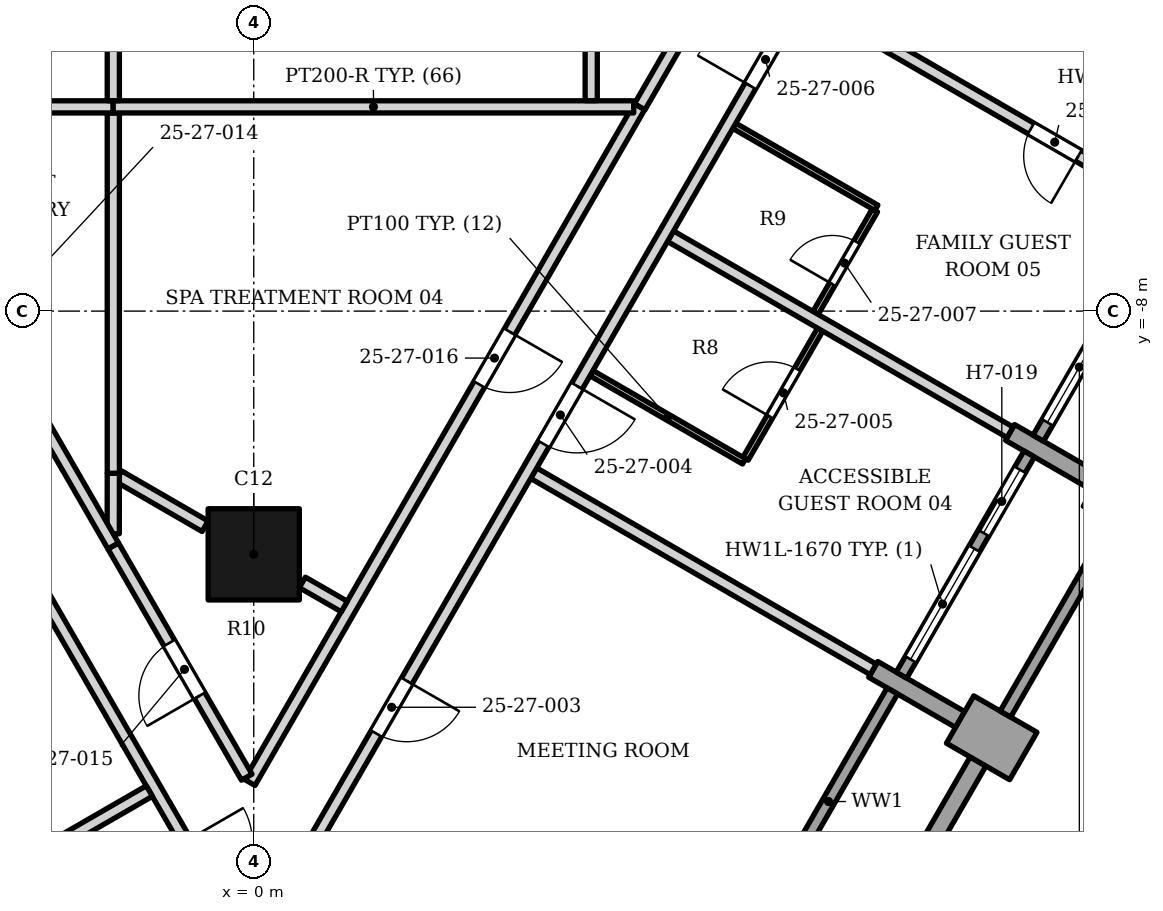
"""IFC4 building model, lengths in metres.
Left out: names, types, materials, properties, quantities, classifications, styles, units other than length and angle.
Written with IfcOpenShell. Run it as: python <this file> out.ifc"""

import sys

from ifc_helpers import new_model, si_unit, direction, frame, frame_2d, origin, origin_2d, place, context, subcontext, project, spatial, rectangle, extrude, element, fill, save


model = new_model("IFC4")
c1 = context("Model", 3, precision=1e-05, world=origin(), true_north=direction((0.0, 1.0)))
c2 = subcontext(c1, "Body", "Model", "MODEL_VIEW")
j1 = project(units=[si_unit("LENGTHUNIT", "METRE"), si_unit("PLANEANGLEUNIT", "RADIAN")], contexts=[c1])
p1 = place(None, origin())
s1 = spatial("IfcSite", under=j1, at=p1, CompositionType="ELEMENT")
p2 = place(p1, origin())
s2 = spatial("IfcBuilding", under=s1, at=p2, CompositionType="ELEMENT")
p3 = place(p2, frame((0.0, 0.0, 112.2)))
s3 = spatial("IfcBuildingStorey", under=s2, at=p3, CompositionType="ELEMENT", Elevation=112.2)
p4 = place(p3, frame((0.0, -12.0, 0.0), z_axis=(0.0, 0.0, 1.0), x_axis=(1.0, 0.0, 0.0)))
e1 = element("IfcColumn", 1, at=p4, inside=s3, PredefinedType="COLUMN", context=c2, shape_type="SweptSolid", body=[
    extrude(rectangle(XDim=1.5, YDim=1.5, at=origin_2d()), origin(), (0.0, 0.0, 1.0), 3.4),
])
p5 = place(p3, frame((14.387, -11.119, 0.0), z_axis=(0.0, 0.0, 1.0), x_axis=(0.5, 0.866025403784, 0.0)))
e2 = element("IfcColumn", 2, at=p5, inside=s3, PredefinedType="COLUMN", context=c2, shape_type="SweptSolid", body=[
    extrude(rectangle(XDim=0.9, YDim=1.2, at=origin_2d()), origin(), (0.0, 0.0, 1.0), 3.4),
])
p6 = place(p3, frame((12.656, -15.317, 0.0), z_axis=(0.0, 0.0, 1.0), x_axis=(-0.866006032174, 0.500033551112, 0.0)))
e3 = element("IfcWall", 3, at=p6, inside=s3, PredefinedType="SOLIDWALL", context=c2, shape_type="SweptSolid", body=[
    extrude(rectangle(XDim=1.2, YDim=0.9, at=frame_2d((0.6, 0.0))), origin(), (0.0, 0.0, 1.0), 2.63),
])
p7 = place(p3, frame((11.617, -14.717, 0.0), z_axis=(0.0, 0.0, 1.0), x_axis=(-0.866040211805, 0.499974350878, 0.0)))
e4 = element("IfcWall", 4, at=p7, inside=s3, PredefinedType="SOLIDWALL", context=c2, shape_type="SweptSolid", body=[
    extrude(rectangle(XDim=1.65, YDim=0.3, at=frame_2d((0.825, 0.0))), origin(), (0.0, 0.0, 1.0), 2.65),
])
p8 = place(p3, frame((12.438, -9.994, 0.0), z_axis=(0.0, 0.0, 1.0), x_axis=(0.866040211805, -0.499974350878, 0.0)))
e5 = element("IfcWall", 5, at=p8, inside=s3, PredefinedType="SOLIDWALL", context=c2, shape_type="SweptSolid", body=[
    extrude(rectangle(XDim=1.65, YDim=0.3, at=frame_2d((0.825, 0.0))), origin(), (0.0, 0.0, 1.0), 2.384),
])
p9 = place(p3, frame((10.112, -18.524, 0.0), z_axis=(0.0, 0.0, 1.0), x_axis=(0.500012057535, 0.866018442252, 0.0)))
e6 = element("IfcWall", 6, at=p9, inside=s3, PredefinedType="SOLIDWALL", context=c2, shape_type="SweptSolid", body=[
    extrude(rectangle(XDim=3.6, YDim=0.3, at=frame_2d((1.8, 0.0))), origin(), (0.0, 0.0, 1.0), 2.63),
])
p10 = place(p3, frame((8.403, -17.884, 0.0), z_axis=(0.0, 0.0, 1.0), x_axis=(0.49998411664, 0.866034573852, 0.0)))
e7 = element("IfcWall", 7, at=p10, inside=s3, PredefinedType="ELEMENTEDWALL", context=c2, shape_type="SweptSolid", body=[
    extrude(rectangle(XDim=4.2, YDim=0.2, at=frame_2d((2.1, 0.0))), origin(), (0.0, 0.0, 1.0), 2.65),
])
p11 = place(p3, frame((12.362, -14.627, 0.0), z_axis=(0.0, 0.0, 1.0), x_axis=(0.500012057535, 0.866018442252, 0.0)))
e8 = element("IfcWall", 8, at=p11, inside=s3, PredefinedType="SOLIDWALL", context=c2, shape_type="SweptSolid", body=[
    extrude(rectangle(XDim=3.6, YDim=0.2, at=frame_2d((1.8, 0.0))), origin(), (0.0, 0.0, 1.0), 2.374),
])
p12 = place(p3, frame((10.653, -13.987, 0.0), z_axis=(0.0, 0.0, 1.0), x_axis=(0.499958946799, 0.866049104564, 0.0)))
e9 = element("IfcWall", 9, at=p12, inside=s3, PredefinedType="ELEMENTEDWALL", context=c2, shape_type="SweptSolid", body=[
    extrude(rectangle(XDim=4.2, YDim=0.2, at=frame_2d((2.1, 0.0))), origin(), (0.0, 0.0, 1.0), 2.374),
])
p13 = place(p12, frame((0.3, 0.0, 0.6)))
e10 = element("IfcOpeningElement", 10, at=p13, cuts=e9, PredefinedType="OPENING", context=c2, shape_type="SweptSolid", body=[
    extrude(rectangle(XDim=2.1, YDim=1.67, at=frame_2d((1.05, 0.835))), frame((0.0, 0.11, 0.0), z_axis=(0.0, -1.0, 0.0), x_axis=(1.0, 0.0, 0.0)), (0.0, 0.0, 1.0), 0.22),
])
p14 = place(p12, frame((2.7, 0.0, 0.0)))
e11 = element("IfcOpeningElement", 11, at=p14, cuts=e9, PredefinedType="OPENING", context=c2, shape_type="SweptSolid", body=[
    extrude(rectangle(XDim=1.2, YDim=2.27, at=frame_2d((0.6, 1.135))), frame((0.0, 0.11, 0.0), z_axis=(0.0, -1.0, 0.0), x_axis=(1.0, 0.0, 0.0)), (0.0, 0.0, 1.0), 0.22),
])
p15 = place(p3, frame((12.903, -10.09, 0.0), z_axis=(0.0, 0.0, 1.0), x_axis=(0.49998411664, 0.866034573852, 0.0)))
e12 = element("IfcWall", 12, at=p15, inside=s3, PredefinedType="ELEMENTEDWALL", context=c2, shape_type="SweptSolid", body=[
    extrude(rectangle(XDim=4.2, YDim=0.2, at=frame_2d((2.1, 0.0))), origin(), (0.0, 0.0, 1.0), 2.384),
])
p16 = place(p15, frame((0.3, 0.0, 0.6)))
e13 = element("IfcOpeningElement", 13, at=p16, cuts=e12, PredefinedType="OPENING", context=c2, shape_type="SweptSolid", body=[
    extrude(rectangle(XDim=2.1, YDim=1.68, at=frame_2d((1.05, 0.84))), frame((0.0, 0.11, 0.0), z_axis=(0.0, -1.0, 0.0), x_axis=(1.0, 0.0, 0.0)), (0.0, 0.0, 1.0), 0.22),
])
p17 = place(p15, frame((2.7, 0.0, 0.0)))
e14 = element("IfcOpeningElement", 14, at=p17, cuts=e12, PredefinedType="OPENING", context=c2, shape_type="SweptSolid", body=[
    extrude(rectangle(XDim=1.2, YDim=2.28, at=frame_2d((0.6, 1.14))), frame((0.0, 0.11, 0.0), z_axis=(0.0, -1.0, 0.0), x_axis=(1.0, 0.0, 0.0)), (0.0, 0.0, 1.0), 0.22),
])
p18 = place(p3, frame((-12.882, 3.644, 0.0), z_axis=(0.0, 0.0, 1.0), x_axis=(0.500000325599, -0.866025215799, 0.0)))
e15 = element("IfcWall", 15, at=p18, inside=s3, PredefinedType="PARTITIONING", context=c2, shape_type="SweptSolid", body=[
    extrude(rectangle(XDim=25.63, YDim=0.2, at=frame_2d((12.815, 0.0))), origin(), (0.0, 0.0, 1.0), 2.384),
])
p19 = place(p18, frame((4.0, 0.0, 0.0)))
e16 = element("IfcOpeningElement", 16, at=p19, cuts=e15, PredefinedType="OPENING", context=c2, shape_type="SweptSolid", body=[
    extrude(rectangle(XDim=1.0, YDim=2.1, at=frame_2d((0.5, 1.05))), frame((0.0, 0.11, 0.0), z_axis=(0.0, -1.0, 0.0), x_axis=(1.0, 0.0, 0.0)), (0.0, 0.0, 1.0), 0.22),
])
p20 = place(p18, frame((14.95, 0.0, 0.0)))
e17 = element("IfcOpeningElement", 17, at=p20, cuts=e15, PredefinedType="OPENING", context=c2, shape_type="SweptSolid", body=[
    extrude(rectangle(XDim=1.6, YDim=2.1, at=frame_2d((0.8, 1.05))), frame((0.0, 0.11, 0.0), z_axis=(0.0, -1.0, 0.0), x_axis=(1.0, 0.0, 0.0)), (0.0, 0.0, 1.0), 0.22),
])
p21 = place(p18, frame((23.515, 0.0, 0.0)))
e18 = element("IfcOpeningElement", 18, at=p21, cuts=e15, PredefinedType="OPENING", context=c2, shape_type="SweptSolid", body=[
    extrude(rectangle(XDim=1.1, YDim=2.1, at=frame_2d((0.55, 1.05))), frame((0.0, 0.11, 0.0), z_axis=(0.0, -1.0, 0.0), x_axis=(1.0, 0.0, 0.0)), (0.0, 0.0, 1.0), 0.22),
])
p22 = place(p3, frame((-6.09, -18.416, 0.0), z_axis=(0.0, 0.0, 1.0), x_axis=(0.866164656326, 0.49975872992, 0.0)))
e19 = element("IfcWall", 19, at=p22, inside=s3, PredefinedType="PARTITIONING", context=c2, shape_type="SweptSolid", body=[
    extrude(rectangle(XDim=5.049, YDim=0.2, at=frame_2d((2.525, 0.0))), origin(), (0.0, 0.0, 1.0), 2.628),
])
p23 = place(p3, frame((-0.065, -15.751, 0.0), z_axis=(0.0, 0.0, 1.0), x_axis=(0.499524753178, 0.866299613854, 0.0)))
e20 = element("IfcWall", 20, at=p23, inside=s3, PredefinedType="PARTITIONING", context=c2, shape_type="SweptSolid", body=[
    extrude(rectangle(XDim=12.83, YDim=0.2, at=frame_2d((6.415, 0.0))), origin(), (0.0, 0.0, 1.0), 2.374),
])
p24 = place(p23, frame((7.556, 0.0, 0.0)))
e21 = element("IfcOpeningElement", 21, at=p24, cuts=e20, PredefinedType="OPENING", context=c2, shape_type="SweptSolid", body=[
    extrude(rectangle(XDim=1.0, YDim=2.1, at=frame_2d((0.5, 1.05))), frame((0.0, 0.11, 0.0), z_axis=(0.0, -1.0, 0.0), x_axis=(1.0, 0.0, 0.0)), (0.0, 0.0, 1.0), 0.22),
])
p25 = place(p3, frame((0.8, -12.462, 0.0), z_axis=(0.0, 0.0, 1.0), x_axis=(0.867012419422, -0.498286528584, 0.0)))
e22 = element("IfcWall", 22, at=p25, inside=s3, PredefinedType="PARTITIONING", context=c2, shape_type="SweptSolid", body=[
    extrude(rectangle(XDim=0.795, YDim=0.2, at=frame_2d((0.397, 0.0))), origin(), (0.0, 0.0, 1.0), 3.23),
])
p26 = place(p3, frame((-2.311, -11.861, 0.0), z_axis=(0.0, 0.0, 1.0), x_axis=(0.499977492351, -0.866038398192, 0.0)))
e23 = element("IfcWall", 23, at=p26, inside=s3, PredefinedType="PARTITIONING", context=c2, shape_type="SweptSolid", body=[
    extrude(rectangle(XDim=4.392, YDim=0.2, at=frame_2d((2.196, 0.0))), origin(), (0.0, 0.0, 1.0), 2.45),
])
p27 = place(p26, frame((1.844, 0.0, 0.0)))
e24 = element("IfcOpeningElement", 24, at=p27, cuts=e23, PredefinedType="OPENING", context=c2, shape_type="SweptSolid", body=[
    extrude(rectangle(XDim=1.0, YDim=2.1, at=frame_2d((0.5, 1.05))), frame((0.0, 0.11, 0.0), z_axis=(0.0, -1.0, 0.0), x_axis=(1.0, 0.0, 0.0)), (0.0, 0.0, 1.0), 0.22),
])
p28 = place(p3, frame((-2.225, -10.714, 0.0), z_axis=(0.0, 0.0, 1.0), x_axis=(0.865565051919, -0.500796506474, 0.0)))
e25 = element("IfcWall", 25, at=p28, inside=s3, PredefinedType="PARTITIONING", context=c2, shape_type="SweptSolid", body=[
    extrude(rectangle(XDim=1.646, YDim=0.2, at=frame_2d((0.823, 0.0))), origin(), (0.0, 0.0, 1.0), 3.23),
])
p29 = place(p3, frame((-2.311, -11.662, 0.0), z_axis=(0.0, 0.0, 1.0), x_axis=(0.001472029808, 0.999998916564, 0.0)))
e26 = element("IfcWall", 26, at=p29, inside=s3, PredefinedType="PARTITIONING", context=c2, shape_type="SweptSolid", body=[
    extrude(rectangle(XDim=0.995, YDim=0.2, at=frame_2d((0.498, 0.0))), origin(), (0.0, 0.0, 1.0), 3.23),
])
p30 = place(p3, frame((4.604, -10.665, 0.0), z_axis=(0.0, 0.0, 1.0), x_axis=(0.865901871826, -0.500213902613, 0.0)))
e27 = element("IfcWall", 27, at=p30, inside=s3, PredefinedType="PARTITIONING", context=c2, shape_type="SweptSolid", body=[
    extrude(rectangle(XDim=6.45, YDim=0.2, at=frame_2d((3.225, 0.0))), origin(), (0.0, 0.0, 1.0), 2.374),
])
p31 = place(p3, frame((8.089, -10.428, 0.0), z_axis=(0.0, 0.0, 1.0), x_axis=(0.500018594424, 0.866014668023, 0.0)))
e28 = element("IfcWall", 28, at=p31, inside=s3, PredefinedType="PARTITIONING", context=c2, shape_type="SweptSolid", body=[
    extrude(rectangle(XDim=2.45, YDim=0.1, at=frame_2d((1.225, 0.0))), origin(), (0.0, 0.0, 1.0), 2.552),
])
p32 = place(p31, frame((0.8, 0.0, 0.0)))
e29 = element("IfcOpeningElement", 29, at=p32, cuts=e28, PredefinedType="OPENING", context=c2, shape_type="SweptSolid", body=[
    extrude(rectangle(XDim=0.9, YDim=2.1, at=frame_2d((0.45, 1.05))), frame((0.0, 0.06, 0.0), z_axis=(0.0, -1.0, 0.0), x_axis=(1.0, 0.0, 0.0)), (0.0, 0.0, 1.0), 0.12),
])
p33 = place(p3, frame((5.553, -9.02, 0.0), z_axis=(0.0, 0.0, 1.0), x_axis=(0.865729701078, -0.500511822708, 0.0)))
e30 = element("IfcWall", 30, at=p33, inside=s3, PredefinedType="PARTITIONING", context=c2, shape_type="SweptSolid", body=[
    extrude(rectangle(XDim=2.9, YDim=0.1, at=frame_2d((1.45, 0.0))), origin(), (0.0, 0.0, 1.0), 3.23),
])
p34 = place(p3, frame((9.24, -8.032, 0.0), z_axis=(0.0, 0.0, 1.0), x_axis=(0.500675951608, 0.865634791053, 0.0)))
e31 = element("IfcWall", 31, at=p34, inside=s3, PredefinedType="PARTITIONING", context=c2, shape_type="SweptSolid", body=[
    extrude(rectangle(XDim=1.95, YDim=0.1, at=frame_2d((0.975, 0.0))), origin(), (0.0, 0.0, 1.0), 3.23),
])
p35 = place(p34, frame((0.55, 0.0, 0.0)))
e32 = element("IfcOpeningElement", 32, at=p35, cuts=e31, PredefinedType="OPENING", context=c2, shape_type="SweptSolid", body=[
    extrude(rectangle(XDim=0.8, YDim=2.1, at=frame_2d((0.4, 1.05))), frame((0.0, 0.06, 0.0), z_axis=(0.0, -1.0, 0.0), x_axis=(1.0, 0.0, 0.0)), (0.0, 0.0, 1.0), 0.12),
])
p36 = place(p3, frame((6.854, -6.768, 0.0), z_axis=(0.0, 0.0, 1.0), x_axis=(0.866012238917, -0.500022801525, 0.0)))
e33 = element("IfcWall", 33, at=p36, inside=s3, PredefinedType="PARTITIONING", context=c2, shape_type="SweptSolid", body=[
    extrude(rectangle(XDim=6.45, YDim=0.2, at=frame_2d((3.225, 0.0))), origin(), (0.0, 0.0, 1.0), 2.552),
])
p37 = place(p3, frame((7.902, -4.952, 0.0), z_axis=(0.0, 0.0, 1.0), x_axis=(0.866339109022, -0.499456252518, 0.0)))
e34 = element("IfcWall", 34, at=p37, inside=s3, PredefinedType="PARTITIONING", context=c2, shape_type="SweptSolid", body=[
    extrude(rectangle(XDim=2.7, YDim=0.1, at=frame_2d((1.35, 0.0))), origin(), (0.0, 0.0, 1.0), 2.552),
])
p38 = place(p3, frame((-2.31, -10.667, 0.0), z_axis=(0.0, 0.0, 1.0), x_axis=(0.0, 1.0, 0.0)))
e35 = element("IfcWall", 35, at=p38, inside=s3, PredefinedType="PARTITIONING", context=c2, shape_type="SweptSolid", body=[
    extrude(rectangle(XDim=5.927, YDim=0.2, at=frame_2d((2.963, 0.0))), origin(), (0.0, 0.0, 1.0), 3.23),
])
p39 = place(p3, frame((-6.478, -4.641, 0.0), z_axis=(0.0, 0.0, 1.0), x_axis=(0.499806127846, -0.866137306994, 0.0)))
e36 = element("IfcWall", 36, at=p39, inside=s3, PredefinedType="PARTITIONING", context=c2, shape_type="SweptSolid", body=[
    extrude(rectangle(XDim=8.335, YDim=0.2, at=frame_2d((4.167, 0.0))), origin(), (0.0, 0.0, 1.0), 2.384),
])
p40 = place(p39, frame((3.716, 0.0, 0.0)))
e37 = element("IfcOpeningElement", 37, at=p40, cuts=e36, PredefinedType="OPENING", context=c2, shape_type="SweptSolid", body=[
    extrude(rectangle(XDim=0.9, YDim=2.1, at=frame_2d((0.45, 1.05))), frame((0.0, 0.11, 0.0), z_axis=(0.0, -1.0, 0.0), x_axis=(1.0, 0.0, 0.0)), (0.0, 0.0, 1.0), 0.22),
])
p41 = place(p3, frame((-6.378, -4.641, 0.0), z_axis=(0.0, 0.0, 1.0), x_axis=(1.0, 0.0, 0.0)))
e38 = element("IfcWall", 38, at=p41, inside=s3, PredefinedType="PARTITIONING", context=c2, shape_type="SweptSolid", body=[
    extrude(rectangle(XDim=4.066, YDim=0.2, at=frame_2d((2.033, 0.0))), origin(), (0.0, 0.0, 1.0), 2.384),
])
p42 = place(p3, frame((-2.311, -4.641, 0.0), z_axis=(0.0, 0.0, 1.0), x_axis=(1.0, 0.0, 0.0)))
e39 = element("IfcWall", 39, at=p42, inside=s3, PredefinedType="PARTITIONING", context=c2, shape_type="SweptSolid", body=[
    extrude(rectangle(XDim=8.56, YDim=0.2, at=frame_2d((4.28, 0.0))), origin(), (0.0, 0.0, 1.0), 2.384),
])
p43 = place(p3, frame((6.348, -4.639, 0.0), z_axis=(0.0, 0.0, 1.0), x_axis=(0.500160597015, 0.865932663198, 0.0)))
e40 = element("IfcWall", 40, at=p43, inside=s3, PredefinedType="PARTITIONING", context=c2, shape_type="SweptSolid", body=[
    extrude(rectangle(XDim=9.63, YDim=0.2, at=frame_2d((4.815, 0.0))), origin(), (0.0, 0.0, 1.0), 2.552),
])
p44 = place(p43, frame((4.315, 0.0, 0.0)))
e41 = element("IfcOpeningElement", 41, at=p44, cuts=e40, PredefinedType="OPENING", context=c2, shape_type="SweptSolid", body=[
    extrude(rectangle(XDim=1.0, YDim=2.1, at=frame_2d((0.5, 1.05))), frame((0.0, 0.11, 0.0), z_axis=(0.0, -1.0, 0.0), x_axis=(1.0, 0.0, 0.0)), (0.0, 0.0, 1.0), 0.22),
])
p45 = place(p3, frame((9.104, -2.871, 0.0), z_axis=(0.0, 0.0, 1.0), x_axis=(0.865901871826, -0.500213902613, 0.0)))
e42 = element("IfcWall", 42, at=p45, inside=s3, PredefinedType="PARTITIONING", context=c2, shape_type="SweptSolid", body=[
    extrude(rectangle(XDim=6.45, YDim=0.2, at=frame_2d((3.225, 0.0))), origin(), (0.0, 0.0, 1.0), 2.384),
])
p46 = place(p45, frame((4.25, 0.0, 0.0)))
e43 = element("IfcOpeningElement", 43, at=p46, cuts=e42, PredefinedType="OPENING", context=c2, shape_type="SweptSolid", body=[
    extrude(rectangle(XDim=0.9, YDim=2.1, at=frame_2d((0.45, 1.05))), frame((0.0, 0.11, 0.0), z_axis=(0.0, -1.0, 0.0), x_axis=(1.0, 0.0, 0.0)), (0.0, 0.0, 1.0), 0.22),
])
p47 = place(p3, frame((0.018, -18.412, 0.0), z_axis=(0.0, 0.0, 1.0), x_axis=(0.49999953585, 0.866025671762, 0.0)))
e44 = element("IfcWall", 44, at=p47, inside=s3, PredefinedType="PARTITIONING", context=c2, shape_type="SweptSolid", body=[
    extrude(rectangle(XDim=22.5, YDim=0.2, at=frame_2d((11.25, 0.0))), origin(), (0.0, 0.0, 1.0), 2.374),
])
p48 = place(p47, frame((4.0, 0.0, 0.0)))
e45 = element("IfcOpeningElement", 45, at=p48, cuts=e44, PredefinedType="OPENING", context=c2, shape_type="SweptSolid", body=[
    extrude(rectangle(XDim=1.0, YDim=2.1, at=frame_2d((0.5, 1.05))), frame((0.0, 0.11, 0.0), z_axis=(0.0, -1.0, 0.0), x_axis=(1.0, 0.0, 0.0)), (0.0, 0.0, 1.0), 0.22),
])
p49 = place(p47, frame((9.5, 0.0, 0.0)))
e46 = element("IfcOpeningElement", 46, at=p49, cuts=e44, PredefinedType="OPENING", context=c2, shape_type="SweptSolid", body=[
    extrude(rectangle(XDim=1.1, YDim=2.1, at=frame_2d((0.55, 1.05))), frame((0.0, 0.11, 0.0), z_axis=(0.0, -1.0, 0.0), x_axis=(1.0, 0.0, 0.0)), (0.0, 0.0, 1.0), 0.22),
])
p50 = place(p47, frame((16.3, 0.0, 0.0)))
e47 = element("IfcOpeningElement", 47, at=p50, cuts=e44, PredefinedType="OPENING", context=c2, shape_type="SweptSolid", body=[
    extrude(rectangle(XDim=1.0, YDim=2.1, at=frame_2d((0.5, 1.05))), frame((0.0, 0.11, 0.0), z_axis=(0.0, -1.0, 0.0), x_axis=(1.0, 0.0, 0.0)), (0.0, 0.0, 1.0), 0.22),
])
p51 = place(p47, frame((18.7, 0.0, 0.0)))
e48 = element("IfcOpeningElement", 48, at=p51, cuts=e44, PredefinedType="OPENING", context=c2, shape_type="SweptSolid", body=[
    extrude(rectangle(XDim=1.0, YDim=2.1, at=frame_2d((0.5, 1.05))), frame((0.0, 0.11, 0.0), z_axis=(0.0, -1.0, 0.0), x_axis=(1.0, 0.0, 0.0)), (0.0, 0.0, 1.0), 0.22),
])
p52 = place(p3, frame((-2.31, -4.539, 0.0), z_axis=(0.0, 0.0, 1.0), x_axis=(0.0, 1.0, 0.0)))
e49 = element("IfcWall", 49, at=p52, inside=s3, PredefinedType="PARTITIONING", context=c2, shape_type="SweptSolid", body=[
    extrude(rectangle(XDim=6.892, YDim=0.2, at=frame_2d((3.446, 0.0))), origin(), (0.0, 0.0, 1.0), 3.23),
])
p53 = place(p3, frame((5.55, -4.539, 0.0), z_axis=(0.0, 0.0, 1.0), x_axis=(0.000203731187, 0.999999979247, 0.0)))
e50 = element("IfcWall", 50, at=p53, inside=s3, PredefinedType="PARTITIONING", context=c2, shape_type="SweptSolid", body=[
    extrude(rectangle(XDim=8.388, YDim=0.2, at=frame_2d((4.194, 0.0))), origin(), (0.0, 0.0, 1.0), 3.23),
])
p54 = place(p13, origin())
e51 = element("IfcWindow", 51, at=p54, inside=s3, PartitioningType="SINGLE_PANEL", PredefinedType="WINDOW", context=c2, shape_type="SweptSolid", body=[
    extrude(rectangle(XDim=2.1, YDim=1.67, at=frame_2d((1.05, 0.835))), frame((0.0, 0.03, 0.0), z_axis=(0.0, -1.0, 0.0), x_axis=(1.0, 0.0, 0.0)), (0.0, 0.0, 1.0), 0.06),
])
fill(e10, e51)
p55 = place(p14, origin())
e52 = element("IfcDoor", 52, at=p55, inside=s3, OperationType="SINGLE_SWING_LEFT", PredefinedType="DOOR", context=c2, shape_type="SweptSolid", body=[
    extrude(rectangle(XDim=1.2, YDim=2.27, at=frame_2d((0.6, 1.135))), frame((0.0, 0.025, 0.0), z_axis=(0.0, -1.0, 0.0), x_axis=(1.0, 0.0, 0.0)), (0.0, 0.0, 1.0), 0.05),
])
fill(e11, e52)
p56 = place(p16, origin())
e53 = element("IfcWindow", 53, at=p56, inside=s3, PartitioningType="SINGLE_PANEL", PredefinedType="WINDOW", context=c2, shape_type="SweptSolid", body=[
    extrude(rectangle(XDim=2.1, YDim=1.68, at=frame_2d((1.05, 0.84))), frame((0.0, 0.03, 0.0), z_axis=(0.0, -1.0, 0.0), x_axis=(1.0, 0.0, 0.0)), (0.0, 0.0, 1.0), 0.06),
])
fill(e13, e53)
p57 = place(p48, origin())
e54 = element("IfcDoor", 54, at=p57, inside=s3, OperationType="SINGLE_SWING_RIGHT", PredefinedType="DOOR", context=c2, shape_type="SweptSolid", body=[
    extrude(rectangle(XDim=1.0, YDim=2.1, at=frame_2d((0.5, 1.05))), frame((0.0, 0.025, 0.0), z_axis=(0.0, -1.0, 0.0), x_axis=(1.0, 0.0, 0.0)), (0.0, 0.0, 1.0), 0.05),
])
fill(e45, e54)
p58 = place(p49, origin())
e55 = element("IfcDoor", 55, at=p58, inside=s3, OperationType="SINGLE_SWING_RIGHT", PredefinedType="DOOR", context=c2, shape_type="SweptSolid", body=[
    extrude(rectangle(XDim=1.1, YDim=2.1, at=frame_2d((0.55, 1.05))), frame((0.0, 0.025, 0.0), z_axis=(0.0, -1.0, 0.0), x_axis=(1.0, 0.0, 0.0)), (0.0, 0.0, 1.0), 0.05),
])
fill(e46, e55)
p59 = place(p32, origin())
e56 = element("IfcDoor", 56, at=p59, inside=s3, OperationType="SINGLE_SWING_LEFT", PredefinedType="DOOR", context=c2, shape_type="SweptSolid", body=[
    extrude(rectangle(XDim=0.9, YDim=2.1, at=frame_2d((0.45, 1.05))), frame((0.0, 0.025, 0.0), z_axis=(0.0, -1.0, 0.0), x_axis=(1.0, 0.0, 0.0)), (0.0, 0.0, 1.0), 0.05),
])
fill(e29, e56)
p60 = place(p50, origin())
e57 = element("IfcDoor", 57, at=p60, inside=s3, OperationType="SINGLE_SWING_LEFT", PredefinedType="DOOR", context=c2, shape_type="SweptSolid", body=[
    extrude(rectangle(XDim=1.0, YDim=2.1, at=frame_2d((0.5, 1.05))), frame((0.0, 0.025, 0.0), z_axis=(0.0, -1.0, 0.0), x_axis=(1.0, 0.0, 0.0)), (0.0, 0.0, 1.0), 0.05),
])
fill(e47, e57)
p61 = place(p35, origin())
e58 = element("IfcDoor", 58, at=p61, inside=s3, OperationType="SINGLE_SWING_LEFT", PredefinedType="DOOR", context=c2, shape_type="SweptSolid", body=[
    extrude(rectangle(XDim=0.8, YDim=2.1, at=frame_2d((0.4, 1.05))), frame((0.0, 0.025, 0.0), z_axis=(0.0, -1.0, 0.0), x_axis=(1.0, 0.0, 0.0)), (0.0, 0.0, 1.0), 0.05),
])
fill(e32, e58)
p62 = place(p46, origin())
e59 = element("IfcDoor", 59, at=p62, inside=s3, OperationType="SINGLE_SWING_RIGHT", PredefinedType="DOOR", context=c2, shape_type="SweptSolid", body=[
    extrude(rectangle(XDim=0.9, YDim=2.1, at=frame_2d((0.45, 1.05))), frame((0.0, 0.025, 0.0), z_axis=(0.0, -1.0, 0.0), x_axis=(1.0, 0.0, 0.0)), (0.0, 0.0, 1.0), 0.05),
])
fill(e43, e59)
p63 = place(p27, origin())
e60 = element("IfcDoor", 60, at=p63, inside=s3, OperationType="SINGLE_SWING_RIGHT", PredefinedType="DOOR", context=c2, shape_type="SweptSolid", body=[
    extrude(rectangle(XDim=1.0, YDim=2.1, at=frame_2d((0.5, 1.05))), frame((0.0, 0.025, 0.0), z_axis=(0.0, -1.0, 0.0), x_axis=(1.0, 0.0, 0.0)), (0.0, 0.0, 1.0), 0.05),
])
fill(e24, e60)
p64 = place(p24, origin())
e61 = element("IfcDoor", 61, at=p64, inside=s3, OperationType="SINGLE_SWING_RIGHT", PredefinedType="DOOR", context=c2, shape_type="SweptSolid", body=[
    extrude(rectangle(XDim=1.0, YDim=2.1, at=frame_2d((0.5, 1.05))), frame((0.0, 0.025, 0.0), z_axis=(0.0, -1.0, 0.0), x_axis=(1.0, 0.0, 0.0)), (0.0, 0.0, 1.0), 0.05),
])
fill(e21, e61)
save(model, sys.argv[1])
